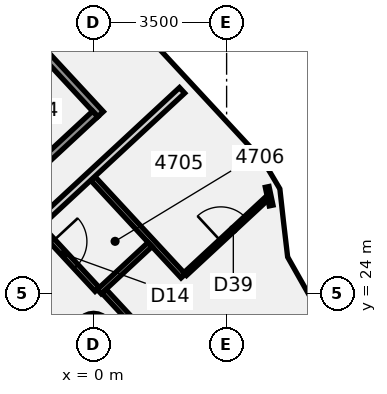
"""IFC4 building model, lengths in metres.
Left out: names, types, materials, properties, quantities, classifications, styles, units other than length and angle.
Written with IfcOpenShell. Run it as: python <this file> out.ifc"""

import sys

from ifc_helpers import new_model, si_unit, direction, frame, frame_2d, origin, origin_2d, place, context, subcontext, project, spatial, rectangle, circle, extrude, element, fill, save


model = new_model("IFC4")
c1 = context("Model", 3, precision=1e-05, world=origin(), true_north=direction((0.0, 1.0)))
c2 = subcontext(c1, "Body", "Model", "MODEL_VIEW")
j1 = project(units=[si_unit("LENGTHUNIT", "METRE"), si_unit("PLANEANGLEUNIT", "RADIAN")], contexts=[c1])
p1 = place(None, origin())
s1 = spatial("IfcSite", under=j1, at=p1, CompositionType="ELEMENT")
p2 = place(p1, origin())
s2 = spatial("IfcBuilding", under=s1, at=p2, CompositionType="ELEMENT")
p3 = place(p2, frame((0.0, 0.0, 189.7)))
s3 = spatial("IfcBuildingStorey", under=s2, at=p3, CompositionType="ELEMENT", Elevation=189.7)
p4 = place(p3, frame((0.0, 23.0, -0.14), z_axis=(0.0, 0.0, 1.0), x_axis=(1.0, 0.0, 0.0)))
e1 = element("IfcColumn", 1, at=p4, inside=s3, PredefinedType="COLUMN", context=c2, shape_type="SweptSolid", body=[
    extrude(circle(Radius=0.475, at=origin_2d()), origin(), (0.0, 0.0, 1.0), 3.6),
])
p5 = place(p3, frame((-1.416, 25.733, 0.0), z_axis=(0.0, 0.0, 1.0), x_axis=(0.679936338433, -0.733271147448, 0.0)))
e2 = element("IfcWall", 2, at=p5, inside=s3, PredefinedType="PARTITIONING", context=c2, shape_type="SweptSolid", body=[
    extrude(rectangle(XDim=2.22, YDim=0.15, at=frame_2d((1.11, 0.0))), origin(), (0.0, 0.0, 1.0), 2.864),
])
p6 = place(p5, frame((0.5, 0.0, 0.0)))
e3 = element("IfcOpeningElement", 3, at=p6, cuts=e2, PredefinedType="OPENING", context=c2, shape_type="SweptSolid", body=[
    extrude(rectangle(XDim=0.9, YDim=2.1, at=frame_2d((0.45, 1.05))), frame((0.0, 0.085, 0.0), z_axis=(0.0, -1.0, 0.0), x_axis=(1.0, 0.0, 0.0)), (0.0, 0.0, 1.0), 0.17),
])
p7 = place(p3, frame((-0.022, 27.025, 0.0), z_axis=(0.0, 0.0, 1.0), x_axis=(0.679701507536, -0.7334888279, 0.0)))
e4 = element("IfcWall", 4, at=p7, inside=s3, PredefinedType="PARTITIONING", context=c2, shape_type="SweptSolid", body=[
    extrude(rectangle(XDim=3.5, YDim=0.15, at=frame_2d((1.75, 0.0))), origin(), (0.0, 0.0, 1.0), 2.864),
])
p8 = place(p3, frame((0.276, 24.055, 0.0), z_axis=(0.0, 0.0, 1.0), x_axis=(0.67991262492, -0.733293135434, 0.0)))
e5 = element("IfcWall", 5, at=p8, inside=s3, PredefinedType="PARTITIONING", context=c2, shape_type="SweptSolid", body=[
    extrude(rectangle(XDim=15.239, YDim=0.15, at=frame_2d((7.62, 0.0))), origin(), (0.0, 0.0, 1.0), 2.864),
])
p9 = place(p8, frame((8.77, 0.0, 0.0)))
e6 = element("IfcOpeningElement", 6, at=p9, cuts=e5, PredefinedType="OPENING", context=c2, shape_type="SweptSolid", body=[
    extrude(rectangle(XDim=1.8, YDim=2.1, at=frame_2d((0.9, 1.05))), frame((0.0, 0.085, 0.0), z_axis=(0.0, -1.0, 0.0), x_axis=(1.0, 0.0, 0.0)), (0.0, 0.0, 1.0), 0.17),
])
p10 = place(p3, frame((-8.098, 19.673, 0.0), z_axis=(0.0, 0.0, 1.0), x_axis=(0.733267845556, 0.67993989931, 0.0)))
e7 = element("IfcWall", 7, at=p10, inside=s3, PredefinedType="PARTITIONING", context=c2, shape_type="SweptSolid", body=[
    extrude(rectangle(XDim=14.219, YDim=0.2, at=frame_2d((7.11, 0.0))), origin(), (0.0, 0.0, 1.0), 2.864),
])
p11 = place(p10, frame((6.62, 0.0, 0.0)))
e8 = element("IfcOpeningElement", 8, at=p11, cuts=e7, PredefinedType="OPENING", context=c2, shape_type="SweptSolid", body=[
    extrude(rectangle(XDim=1.4, YDim=2.1, at=frame_2d((0.7, 1.05))), frame((0.0, 0.11, 0.0), z_axis=(0.0, -1.0, 0.0), x_axis=(1.0, 0.0, 0.0)), (0.0, 0.0, 1.0), 0.22),
])
p12 = place(p10, frame((2.17, 0.0, 0.0)))
e9 = element("IfcOpeningElement", 9, at=p12, cuts=e7, PredefinedType="OPENING", context=c2, shape_type="SweptSolid", body=[
    extrude(rectangle(XDim=0.9, YDim=2.1, at=frame_2d((0.45, 1.05))), frame((0.0, 0.11, 0.0), z_axis=(0.0, -1.0, 0.0), x_axis=(1.0, 0.0, 0.0)), (0.0, 0.0, 1.0), 0.22),
])
p13 = place(p3, frame((2.412, 24.509, 0.0), z_axis=(0.0, 0.0, 1.0), x_axis=(0.733258356223, 0.679950132752, 0.0)))
e10 = element("IfcWall", 10, at=p13, inside=s3, PredefinedType="PARTITIONING", context=c2, shape_type="SweptSolid", body=[
    extrude(rectangle(XDim=2.936, YDim=0.1, at=frame_2d((1.468, 0.0))), origin(), (0.0, 0.0, 1.0), 2.864),
])
p14 = place(p13, frame((1.275, 0.0, 0.0)))
e11 = element("IfcOpeningElement", 11, at=p14, cuts=e10, PredefinedType="OPENING", context=c2, shape_type="SweptSolid", body=[
    extrude(rectangle(XDim=0.9, YDim=2.1, at=frame_2d((0.45, 1.05))), frame((0.0, 0.06, 0.0), z_axis=(0.0, -1.0, 0.0), x_axis=(1.0, 0.0, 0.0)), (0.0, 0.0, 1.0), 0.12),
])
p15 = place(p3, frame((0.148, 24.046, 0.0), z_axis=(0.0, 0.0, 1.0), x_axis=(0.733299775598, 0.679905463361, 0.0)))
e12 = element("IfcWall", 12, at=p15, inside=s3, PredefinedType="PARTITIONING", context=c2, shape_type="SweptSolid", body=[
    extrude(rectangle(XDim=1.82, YDim=0.15, at=frame_2d((0.91, 0.0))), origin(), (0.0, 0.0, 1.0), 2.864),
])
p16 = place(p3, frame((4.671, 26.312, 0.0), z_axis=(0.0, 0.0, 1.0), x_axis=(-0.207093447058, 0.978321166175, 0.0)))
e13 = element("IfcWall", 13, at=p16, inside=s3, PredefinedType="PARTITIONING", context=c2, shape_type="SweptSolid", body=[
    extrude(rectangle(XDim=0.5, YDim=0.1, at=frame_2d((0.25, 0.0))), origin(), (0.0, 0.0, 1.0), 2.864),
])
p17 = place(p3, frame((0.183, 28.715, -0.14), z_axis=(0.0, 0.0, 1.0), x_axis=(-0.679911421173, 0.733294251551, 0.0)))
e14 = element("IfcWall", 14, at=p17, inside=s3, PredefinedType="SHEAR", context=c2, shape_type="SweptSolid", body=[
    extrude(rectangle(XDim=6.7, YDim=0.2, at=frame_2d((3.35, 0.0))), origin(), (0.0, 0.0, 1.0), 3.004),
])
p18 = place(p3, frame((0.042, 28.721, -0.14), z_axis=(0.0, 0.0, 1.0), x_axis=(-0.733268848454, -0.679938817753, 0.0)))
e15 = element("IfcWall", 15, at=p18, inside=s3, PredefinedType="SHEAR", context=c2, shape_type="SweptSolid", body=[
    extrude(rectangle(XDim=3.2, YDim=0.2, at=frame_2d((1.6, 0.0))), origin(), (0.0, 0.0, 1.0), 3.004),
])
p19 = place(p6, origin())
e16 = element("IfcDoor", 16, at=p19, inside=s3, OperationType="SINGLE_SWING_RIGHT", PredefinedType="DOOR", context=c2, shape_type="SweptSolid", body=[
    extrude(rectangle(XDim=0.9, YDim=2.1, at=frame_2d((0.45, 1.05))), frame((0.0, 0.025, 0.0), z_axis=(0.0, -1.0, 0.0), x_axis=(1.0, 0.0, 0.0)), (0.0, 0.0, 1.0), 0.05),
])
fill(e3, e16)
p20 = place(p14, origin())
e17 = element("IfcDoor", 17, at=p20, inside=s3, OperationType="SINGLE_SWING_LEFT", PredefinedType="DOOR", context=c2, shape_type="SweptSolid", body=[
    extrude(rectangle(XDim=0.9, YDim=2.1, at=frame_2d((0.45, 1.05))), frame((0.0, 0.025, 0.0), z_axis=(0.0, -1.0, 0.0), x_axis=(1.0, 0.0, 0.0)), (0.0, 0.0, 1.0), 0.05),
])
fill(e11, e17)
save(model, sys.argv[1])
